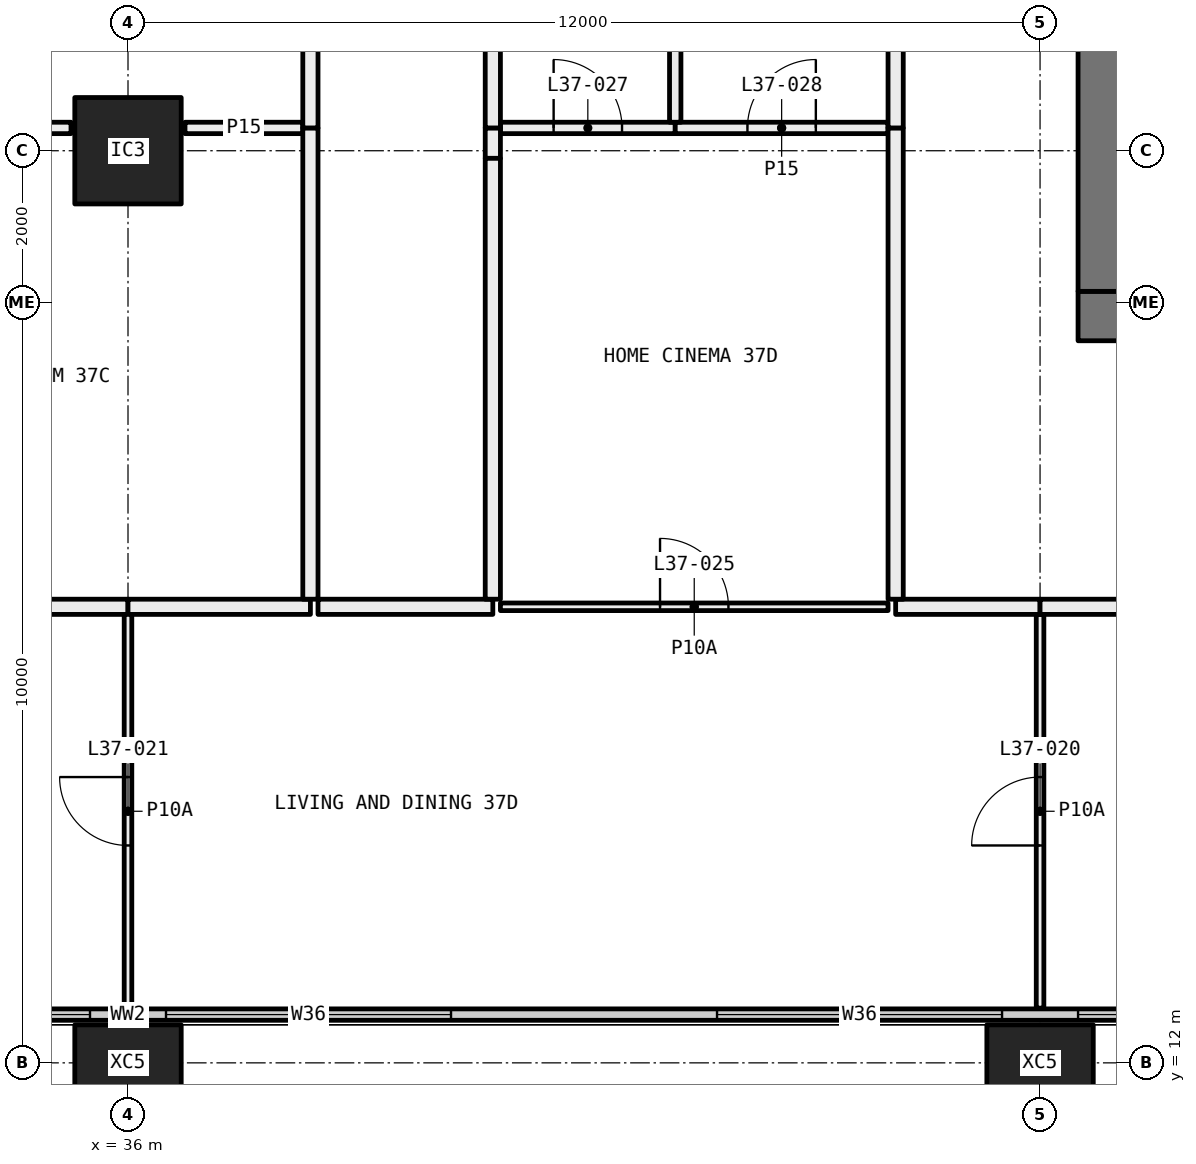
"""IFC4 building model, lengths in metres.
Left out: names, types, materials, properties, quantities, classifications, styles, units other than length and angle.
Written with IfcOpenShell. Run it as: python <this file> out.ifc"""

import sys

from ifc_helpers import new_model, si_unit, direction, frame, frame_2d, origin, origin_2d, place, context, subcontext, project, spatial, rectangle, hollow_rectangle, extrude, element, fill, save


model = new_model("IFC4")
c1 = context("Model", 3, precision=1e-05, world=origin(), true_north=direction((0.0, 1.0)))
c2 = subcontext(c1, "Body", "Model", "MODEL_VIEW")
j1 = project(units=[si_unit("LENGTHUNIT", "METRE"), si_unit("PLANEANGLEUNIT", "RADIAN")], contexts=[c1])
p1 = place(None, origin())
s1 = spatial("IfcSite", under=j1, at=p1, CompositionType="ELEMENT")
p2 = place(p1, origin())
s2 = spatial("IfcBuilding", under=s1, at=p2, CompositionType="ELEMENT")
p3 = place(p2, frame((0.0, 0.0, 141.45)))
s3 = spatial("IfcBuildingStorey", under=s2, at=p3, CompositionType="ELEMENT", Elevation=141.45)
p4 = place(p3, frame((36.0, 12.0, -0.4), z_axis=(0.0, 0.0, 1.0), x_axis=(1.0, 0.0, 0.0)))
e1 = element("IfcColumn", 1, at=p4, inside=s3, PredefinedType="COLUMN", context=c2, shape_type="SweptSolid", body=[
    extrude(hollow_rectangle(XDim=1.4, YDim=1.0, WallThickness=0.055, at=origin_2d()), origin(), (0.0, 0.0, 1.0), 3.45),
])
p5 = place(p3, frame((36.0, 24.0, 0.0), z_axis=(0.0, 0.0, 1.0), x_axis=(1.0, 0.0, 0.0)))
e2 = element("IfcColumn", 2, at=p5, inside=s3, PredefinedType="COLUMN", context=c2, shape_type="SweptSolid", body=[
    extrude(hollow_rectangle(XDim=1.4, YDim=1.4, WallThickness=0.06, at=origin_2d()), origin(), (0.0, 0.0, 1.0), 3.05),
])
p6 = place(p3, frame((48.0, 12.0, -0.4), z_axis=(0.0, 0.0, 1.0), x_axis=(1.0, 0.0, 0.0)))
e3 = element("IfcColumn", 3, at=p6, inside=s3, PredefinedType="COLUMN", context=c2, shape_type="SweptSolid", body=[
    extrude(hollow_rectangle(XDim=1.4, YDim=1.0, WallThickness=0.055, at=origin_2d()), origin(), (0.0, 0.0, 1.0), 3.45),
])
p7 = place(p3, frame((6.56, 12.635, 0.0), z_axis=(0.0, 0.0, 1.0), x_axis=(1.0, 0.0, 0.0)))
e4 = element("IfcWall", 4, at=p7, inside=s3, PredefinedType="ELEMENTEDWALL", context=c2, shape_type="SweptSolid", body=[
    extrude(rectangle(XDim=58.88, YDim=0.15, at=frame_2d((29.44, 0.0))), origin(), (0.0, 0.0, 1.0), 3.05),
])
p8 = place(p7, frame((0.44, 0.0, 0.45)))
e5 = element("IfcOpeningElement", 5, at=p8, cuts=e4, PredefinedType="OPENING", context=c2, shape_type="SweptSolid", body=[
    extrude(rectangle(XDim=4.5, YDim=2.55, at=frame_2d((2.25, 1.275))), frame((0.0, 0.085, 0.0), z_axis=(0.0, -1.0, 0.0), x_axis=(1.0, 0.0, 0.0)), (0.0, 0.0, 1.0), 0.17),
])
p9 = place(p7, frame((5.94, 0.0, 0.45)))
e6 = element("IfcOpeningElement", 6, at=p9, cuts=e4, PredefinedType="OPENING", context=c2, shape_type="SweptSolid", body=[
    extrude(rectangle(XDim=3.75, YDim=2.55, at=frame_2d((1.875, 1.275))), frame((0.0, 0.085, 0.0), z_axis=(0.0, -1.0, 0.0), x_axis=(1.0, 0.0, 0.0)), (0.0, 0.0, 1.0), 0.17),
])
p10 = place(p7, frame((13.19, 0.0, 0.45)))
e7 = element("IfcOpeningElement", 7, at=p10, cuts=e4, PredefinedType="OPENING", context=c2, shape_type="SweptSolid", body=[
    extrude(rectangle(XDim=3.75, YDim=2.55, at=frame_2d((1.875, 1.275))), frame((0.0, 0.085, 0.0), z_axis=(0.0, -1.0, 0.0), x_axis=(1.0, 0.0, 0.0)), (0.0, 0.0, 1.0), 0.17),
])
p11 = place(p7, frame((17.94, 0.0, 0.45)))
e8 = element("IfcOpeningElement", 8, at=p11, cuts=e4, PredefinedType="OPENING", context=c2, shape_type="SweptSolid", body=[
    extrude(rectangle(XDim=3.75, YDim=2.55, at=frame_2d((1.875, 1.275))), frame((0.0, 0.085, 0.0), z_axis=(0.0, -1.0, 0.0), x_axis=(1.0, 0.0, 0.0)), (0.0, 0.0, 1.0), 0.17),
])
p12 = place(p7, frame((25.19, 0.0, 0.45)))
e9 = element("IfcOpeningElement", 9, at=p12, cuts=e4, PredefinedType="OPENING", context=c2, shape_type="SweptSolid", body=[
    extrude(rectangle(XDim=0.75, YDim=2.55, at=frame_2d((0.375, 1.275))), frame((0.0, 0.085, 0.0), z_axis=(0.0, -1.0, 0.0), x_axis=(1.0, 0.0, 0.0)), (0.0, 0.0, 1.0), 0.17),
])
p13 = place(p7, frame((26.94, 0.0, 0.45)))
e10 = element("IfcOpeningElement", 10, at=p13, cuts=e4, PredefinedType="OPENING", context=c2, shape_type="SweptSolid", body=[
    extrude(rectangle(XDim=2.0, YDim=2.55, at=frame_2d((1.0, 1.275))), frame((0.0, 0.085, 0.0), z_axis=(0.0, -1.0, 0.0), x_axis=(1.0, 0.0, 0.0)), (0.0, 0.0, 1.0), 0.17),
])
p14 = place(p7, frame((29.94, 0.0, 0.45)))
e11 = element("IfcOpeningElement", 11, at=p14, cuts=e4, PredefinedType="OPENING", context=c2, shape_type="SweptSolid", body=[
    extrude(rectangle(XDim=3.75, YDim=2.55, at=frame_2d((1.875, 1.275))), frame((0.0, 0.085, 0.0), z_axis=(0.0, -1.0, 0.0), x_axis=(1.0, 0.0, 0.0)), (0.0, 0.0, 1.0), 0.17),
])
p15 = place(p7, frame((37.19, 0.0, 0.45)))
e12 = element("IfcOpeningElement", 12, at=p15, cuts=e4, PredefinedType="OPENING", context=c2, shape_type="SweptSolid", body=[
    extrude(rectangle(XDim=3.75, YDim=2.55, at=frame_2d((1.875, 1.275))), frame((0.0, 0.085, 0.0), z_axis=(0.0, -1.0, 0.0), x_axis=(1.0, 0.0, 0.0)), (0.0, 0.0, 1.0), 0.17),
])
p16 = place(p7, frame((41.94, 0.0, 0.45)))
e13 = element("IfcOpeningElement", 13, at=p16, cuts=e4, PredefinedType="OPENING", context=c2, shape_type="SweptSolid", body=[
    extrude(rectangle(XDim=3.75, YDim=2.55, at=frame_2d((1.875, 1.275))), frame((0.0, 0.085, 0.0), z_axis=(0.0, -1.0, 0.0), x_axis=(1.0, 0.0, 0.0)), (0.0, 0.0, 1.0), 0.17),
])
p17 = place(p7, frame((49.19, 0.0, 0.45)))
e14 = element("IfcOpeningElement", 14, at=p17, cuts=e4, PredefinedType="OPENING", context=c2, shape_type="SweptSolid", body=[
    extrude(rectangle(XDim=0.75, YDim=2.55, at=frame_2d((0.375, 1.275))), frame((0.0, 0.085, 0.0), z_axis=(0.0, -1.0, 0.0), x_axis=(1.0, 0.0, 0.0)), (0.0, 0.0, 1.0), 0.17),
])
p18 = place(p7, frame((50.94, 0.0, 0.45)))
e15 = element("IfcOpeningElement", 15, at=p18, cuts=e4, PredefinedType="OPENING", context=c2, shape_type="SweptSolid", body=[
    extrude(rectangle(XDim=2.0, YDim=2.55, at=frame_2d((1.0, 1.275))), frame((0.0, 0.085, 0.0), z_axis=(0.0, -1.0, 0.0), x_axis=(1.0, 0.0, 0.0)), (0.0, 0.0, 1.0), 0.17),
])
p19 = place(p7, frame((53.94, 0.0, 0.45)))
e16 = element("IfcOpeningElement", 16, at=p19, cuts=e4, PredefinedType="OPENING", context=c2, shape_type="SweptSolid", body=[
    extrude(rectangle(XDim=4.5, YDim=2.55, at=frame_2d((2.25, 1.275))), frame((0.0, 0.085, 0.0), z_axis=(0.0, -1.0, 0.0), x_axis=(1.0, 0.0, 0.0)), (0.0, 0.0, 1.0), 0.17),
])
p20 = place(p3, frame((35.25, 24.3, 0.0), z_axis=(0.0, 0.0, 1.0), x_axis=(-1.0, 0.0, 0.0)))
e17 = element("IfcWall", 17, at=p20, inside=s3, PredefinedType="PARTITIONING", context=c2, shape_type="SweptSolid", body=[
    extrude(rectangle(XDim=2.25, YDim=0.15, at=frame_2d((1.125, 0.0))), origin(), (0.0, 0.0, 1.0), 3.05),
])
p21 = place(p3, frame((38.3, 24.3, 0.0), z_axis=(0.0, 0.0, 1.0), x_axis=(-1.0, 0.0, 0.0)))
e18 = element("IfcWall", 18, at=p21, inside=s3, PredefinedType="PARTITIONING", context=c2, shape_type="SweptSolid", body=[
    extrude(rectangle(XDim=1.55, YDim=0.15, at=frame_2d((0.775, 0.0))), origin(), (0.0, 0.0, 1.0), 3.05),
])
p22 = place(p3, frame((30.0, 18.0, 0.0), z_axis=(0.0, 0.0, 1.0), x_axis=(1.0, 0.0, 0.0)))
e19 = element("IfcWall", 19, at=p22, inside=s3, PredefinedType="PARTITIONING", context=c2, shape_type="SweptSolid", body=[
    extrude(rectangle(XDim=6.0, YDim=0.2, at=frame_2d((3.0, 0.0))), origin(), (0.0, 0.0, 1.0), 2.45),
])
p23 = place(p3, frame((36.0, 18.0, 0.0), z_axis=(0.0, 0.0, 1.0), x_axis=(1.0, 0.0, 0.0)))
e20 = element("IfcWall", 20, at=p23, inside=s3, PredefinedType="PARTITIONING", context=c2, shape_type="SweptSolid", body=[
    extrude(rectangle(XDim=2.4, YDim=0.2, at=frame_2d((1.2, 0.0))), origin(), (0.0, 0.0, 1.0), 2.45),
])
p24 = place(p3, frame((38.4, 18.1, 0.0), z_axis=(0.0, 0.0, 1.0), x_axis=(0.0, 1.0, 0.0)))
e21 = element("IfcWall", 21, at=p24, inside=s3, PredefinedType="PARTITIONING", context=c2, shape_type="SweptSolid", body=[
    extrude(rectangle(XDim=6.2, YDim=0.2, at=frame_2d((3.1, 0.0))), origin(), (0.0, 0.0, 1.0), 2.45),
])
p25 = place(p3, frame((38.4, 24.3, 0.0), z_axis=(0.0, 0.0, 1.0), x_axis=(0.0, 1.0, 0.0)))
e22 = element("IfcWall", 22, at=p25, inside=s3, PredefinedType="PARTITIONING", context=c2, shape_type="SweptSolid", body=[
    extrude(rectangle(XDim=4.5, YDim=0.2, at=frame_2d((2.25, 0.0))), origin(), (0.0, 0.0, 1.0), 3.05),
])
p26 = place(p3, frame((36.0, 12.72, 0.0), z_axis=(0.0, 0.0, 1.0), x_axis=(0.0, 1.0, 0.0)))
e23 = element("IfcWall", 23, at=p26, inside=s3, PredefinedType="PARTITIONING", context=c2, shape_type="SweptSolid", body=[
    extrude(rectangle(XDim=5.18, YDim=0.1, at=frame_2d((2.59, 0.0))), origin(), (0.0, 0.0, 1.0), 2.45),
])
p27 = place(p26, frame((2.14, 0.0, 0.0)))
e24 = element("IfcOpeningElement", 24, at=p27, cuts=e23, PredefinedType="OPENING", context=c2, shape_type="SweptSolid", body=[
    extrude(rectangle(XDim=0.9, YDim=2.1, at=frame_2d((0.45, 1.05))), frame((0.0, 0.06, 0.0), z_axis=(0.0, -1.0, 0.0), x_axis=(1.0, 0.0, 0.0)), (0.0, 0.0, 1.0), 0.12),
])
p28 = place(p3, frame((48.0, 12.72, 0.0), z_axis=(0.0, 0.0, 1.0), x_axis=(0.0, 1.0, 0.0)))
e25 = element("IfcWall", 25, at=p28, inside=s3, PredefinedType="PARTITIONING", context=c2, shape_type="SweptSolid", body=[
    extrude(rectangle(XDim=5.18, YDim=0.1, at=frame_2d((2.59, 0.0))), origin(), (0.0, 0.0, 1.0), 3.05),
])
p29 = place(p28, frame((2.14, 0.0, 0.0)))
e26 = element("IfcOpeningElement", 26, at=p29, cuts=e25, PredefinedType="OPENING", context=c2, shape_type="SweptSolid", body=[
    extrude(rectangle(XDim=0.9, YDim=2.1, at=frame_2d((0.45, 1.05))), frame((0.0, 0.06, 0.0), z_axis=(0.0, -1.0, 0.0), x_axis=(1.0, 0.0, 0.0)), (0.0, 0.0, 1.0), 0.12),
])
p30 = place(p3, frame((46.0, 18.0, 0.0), z_axis=(0.0, 0.0, 1.0), x_axis=(-1.0, 0.0, 0.0)))
e27 = element("IfcWall", 27, at=p30, inside=s3, PredefinedType="PARTITIONING", context=c2, shape_type="SweptSolid", body=[
    extrude(rectangle(XDim=5.1, YDim=0.1, at=frame_2d((2.55, 0.0))), origin(), (0.0, 0.0, 1.0), 3.05),
])
p31 = place(p30, frame((2.1, 0.0, 0.0)))
e28 = element("IfcOpeningElement", 28, at=p31, cuts=e27, PredefinedType="OPENING", context=c2, shape_type="SweptSolid", body=[
    extrude(rectangle(XDim=0.9, YDim=2.1, at=frame_2d((0.45, 1.05))), frame((0.0, 0.06, 0.0), z_axis=(0.0, -1.0, 0.0), x_axis=(1.0, 0.0, 0.0)), (0.0, 0.0, 1.0), 0.12),
])
p32 = place(p3, frame((40.8, 18.0, 0.0), z_axis=(0.0, 0.0, 1.0), x_axis=(-1.0, 0.0, 0.0)))
e29 = element("IfcWall", 29, at=p32, inside=s3, PredefinedType="PARTITIONING", context=c2, shape_type="SweptSolid", body=[
    extrude(rectangle(XDim=2.3, YDim=0.2, at=frame_2d((1.15, 0.0))), origin(), (0.0, 0.0, 1.0), 3.05),
])
p33 = place(p3, frame((48.0, 18.0, 0.0), z_axis=(0.0, 0.0, 1.0), x_axis=(-1.0, 0.0, 0.0)))
e30 = element("IfcWall", 30, at=p33, inside=s3, PredefinedType="PARTITIONING", context=c2, shape_type="SweptSolid", body=[
    extrude(rectangle(XDim=1.9, YDim=0.2, at=frame_2d((0.95, 0.0))), origin(), (0.0, 0.0, 1.0), 3.05),
])
p34 = place(p3, frame((54.0, 18.0, 0.0), z_axis=(0.0, 0.0, 1.0), x_axis=(-1.0, 0.0, 0.0)))
e31 = element("IfcWall", 31, at=p34, inside=s3, PredefinedType="PARTITIONING", context=c2, shape_type="SweptSolid", body=[
    extrude(rectangle(XDim=6.0, YDim=0.2, at=frame_2d((3.0, 0.0))), origin(), (0.0, 0.0, 1.0), 3.05),
])
p35 = place(p34, frame((2.5, 0.0, 0.0)))
e32 = element("IfcOpeningElement", 32, at=p35, cuts=e31, PredefinedType="OPENING", context=c2, shape_type="SweptSolid", body=[
    extrude(rectangle(XDim=1.0, YDim=2.1, at=frame_2d((0.5, 1.05))), frame((0.0, 0.11, 0.0), z_axis=(0.0, -1.0, 0.0), x_axis=(1.0, 0.0, 0.0)), (0.0, 0.0, 1.0), 0.22),
])
p36 = place(p3, frame((43.2, 24.3, 0.0), z_axis=(0.0, 0.0, 1.0), x_axis=(-1.0, 0.0, 0.0)))
e33 = element("IfcWall", 33, at=p36, inside=s3, PredefinedType="PARTITIONING", context=c2, shape_type="SweptSolid", body=[
    extrude(rectangle(XDim=2.3, YDim=0.15, at=frame_2d((1.15, 0.0))), origin(), (0.0, 0.0, 1.0), 3.05),
])
p37 = place(p36, frame((0.7, 0.0, 0.0)))
e34 = element("IfcOpeningElement", 34, at=p37, cuts=e33, PredefinedType="OPENING", context=c2, shape_type="SweptSolid", body=[
    extrude(rectangle(XDim=0.9, YDim=2.1, at=frame_2d((0.45, 1.05))), frame((0.0, 0.085, 0.0), z_axis=(0.0, -1.0, 0.0), x_axis=(1.0, 0.0, 0.0)), (0.0, 0.0, 1.0), 0.17),
])
p38 = place(p3, frame((46.0, 24.3, 0.0), z_axis=(0.0, 0.0, 1.0), x_axis=(-1.0, 0.0, 0.0)))
e35 = element("IfcWall", 35, at=p38, inside=s3, PredefinedType="PARTITIONING", context=c2, shape_type="SweptSolid", body=[
    extrude(rectangle(XDim=2.8, YDim=0.15, at=frame_2d((1.4, 0.0))), origin(), (0.0, 0.0, 1.0), 3.05),
])
p39 = place(p38, frame((0.95, 0.0, 0.0)))
e36 = element("IfcOpeningElement", 36, at=p39, cuts=e35, PredefinedType="OPENING", context=c2, shape_type="SweptSolid", body=[
    extrude(rectangle(XDim=0.9, YDim=2.1, at=frame_2d((0.45, 1.05))), frame((0.0, 0.085, 0.0), z_axis=(0.0, -1.0, 0.0), x_axis=(1.0, 0.0, 0.0)), (0.0, 0.0, 1.0), 0.17),
])
p40 = place(p3, frame((40.8, 24.3, 0.0), z_axis=(0.0, 0.0, 1.0), x_axis=(0.0, -1.0, 0.0)))
e37 = element("IfcWall", 37, at=p40, inside=s3, PredefinedType="PARTITIONING", context=c2, shape_type="SweptSolid", body=[
    extrude(rectangle(XDim=0.4, YDim=0.2, at=frame_2d((0.2, 0.0))), origin(), (0.0, 0.0, 1.0), 2.45),
])
p41 = place(p3, frame((40.8, 23.9, 0.0), z_axis=(0.0, 0.0, 1.0), x_axis=(0.0, -1.0, 0.0)))
e38 = element("IfcWall", 38, at=p41, inside=s3, PredefinedType="PARTITIONING", context=c2, shape_type="SweptSolid", body=[
    extrude(rectangle(XDim=5.8, YDim=0.2, at=frame_2d((2.9, 0.0))), origin(), (0.0, 0.0, 1.0), 3.05),
])
p42 = place(p3, frame((46.1, 18.1, 0.0), z_axis=(0.0, 0.0, 1.0), x_axis=(0.0, 1.0, 0.0)))
e39 = element("IfcWall", 39, at=p42, inside=s3, PredefinedType="PARTITIONING", context=c2, shape_type="SweptSolid", body=[
    extrude(rectangle(XDim=6.2, YDim=0.2, at=frame_2d((3.1, 0.0))), origin(), (0.0, 0.0, 1.0), 2.45),
])
p43 = place(p3, frame((43.2, 24.375, 0.0), z_axis=(0.0, 0.0, 1.0), x_axis=(0.0, 1.0, 0.0)))
e40 = element("IfcWall", 40, at=p43, inside=s3, PredefinedType="PARTITIONING", context=c2, shape_type="SweptSolid", body=[
    extrude(rectangle(XDim=2.1, YDim=0.15, at=frame_2d((1.05, 0.0))), origin(), (0.0, 0.0, 1.0), 3.05),
])
p44 = place(p3, frame((40.8, 26.55, 0.0), z_axis=(0.0, 0.0, 1.0), x_axis=(0.0, -1.0, 0.0)))
e41 = element("IfcWall", 41, at=p44, inside=s3, PredefinedType="PARTITIONING", context=c2, shape_type="SweptSolid", body=[
    extrude(rectangle(XDim=2.25, YDim=0.2, at=frame_2d((1.125, 0.0))), origin(), (0.0, 0.0, 1.0), 3.05),
])
p45 = place(p3, frame((46.1, 24.3, 0.0), z_axis=(0.0, 0.0, 1.0), x_axis=(0.0, 1.0, 0.0)))
e42 = element("IfcWall", 42, at=p45, inside=s3, PredefinedType="PARTITIONING", context=c2, shape_type="SweptSolid", body=[
    extrude(rectangle(XDim=4.5, YDim=0.2, at=frame_2d((2.25, 0.0))), origin(), (0.0, 0.0, 1.0), 3.05),
])
p46 = place(p3, frame((59.5, 21.825, 0.0), z_axis=(0.0, 0.0, 1.0), x_axis=(-1.0, 0.0, 0.0)))
e43 = element("IfcWall", 43, at=p46, inside=s3, PredefinedType="SHEAR", context=c2, shape_type="SweptSolid", body=[
    extrude(rectangle(XDim=11.0, YDim=0.65, at=frame_2d((5.5, 0.0))), origin(), (0.0, 0.0, 1.0), 3.05),
])
p47 = place(p3, frame((48.825, 22.15, 0.0), z_axis=(0.0, 0.0, 1.0), x_axis=(0.0, 1.0, 0.0)))
e44 = element("IfcWall", 44, at=p47, inside=s3, PredefinedType="SHEAR", context=c2, shape_type="SweptSolid", body=[
    extrude(rectangle(XDim=15.7, YDim=0.65, at=frame_2d((7.85, 0.0))), origin(), (0.0, 0.0, 1.0), 3.05),
])
p48 = place(p47, frame((7.05, 0.0, 0.0)))
e45 = element("IfcOpeningElement", 45, at=p48, cuts=e44, PredefinedType="OPENING", context=c2, shape_type="SweptSolid", body=[
    extrude(rectangle(XDim=1.6, YDim=2.1, at=frame_2d((0.8, 1.05))), frame((0.0, 0.335, 0.0), z_axis=(0.0, -1.0, 0.0), x_axis=(1.0, 0.0, 0.0)), (0.0, 0.0, 1.0), 0.67),
])
p49 = place(p13, origin())
e46 = element("IfcWindow", 46, at=p49, inside=s3, PartitioningType="SINGLE_PANEL", PredefinedType="WINDOW", context=c2, shape_type="SweptSolid", body=[
    extrude(rectangle(XDim=2.0, YDim=2.55, at=frame_2d((1.0, 1.275))), frame((0.0, 0.03, 0.0), z_axis=(0.0, -1.0, 0.0), x_axis=(1.0, 0.0, 0.0)), (0.0, 0.0, 1.0), 0.06),
])
fill(e10, e46)
p50 = place(p14, origin())
e47 = element("IfcWindow", 47, at=p50, inside=s3, PartitioningType="SINGLE_PANEL", PredefinedType="WINDOW", context=c2, shape_type="SweptSolid", body=[
    extrude(rectangle(XDim=3.75, YDim=2.55, at=frame_2d((1.875, 1.275))), frame((0.0, 0.03, 0.0), z_axis=(0.0, -1.0, 0.0), x_axis=(1.0, 0.0, 0.0)), (0.0, 0.0, 1.0), 0.06),
])
fill(e11, e47)
p51 = place(p15, origin())
e48 = element("IfcWindow", 48, at=p51, inside=s3, PartitioningType="SINGLE_PANEL", PredefinedType="WINDOW", context=c2, shape_type="SweptSolid", body=[
    extrude(rectangle(XDim=3.75, YDim=2.55, at=frame_2d((1.875, 1.275))), frame((0.0, 0.03, 0.0), z_axis=(0.0, -1.0, 0.0), x_axis=(1.0, 0.0, 0.0)), (0.0, 0.0, 1.0), 0.06),
])
fill(e12, e48)
p52 = place(p16, origin())
e49 = element("IfcWindow", 49, at=p52, inside=s3, PartitioningType="SINGLE_PANEL", PredefinedType="WINDOW", context=c2, shape_type="SweptSolid", body=[
    extrude(rectangle(XDim=3.75, YDim=2.55, at=frame_2d((1.875, 1.275))), frame((0.0, 0.03, 0.0), z_axis=(0.0, -1.0, 0.0), x_axis=(1.0, 0.0, 0.0)), (0.0, 0.0, 1.0), 0.06),
])
fill(e13, e49)
p53 = place(p29, origin())
e50 = element("IfcDoor", 50, at=p53, inside=s3, OperationType="SINGLE_SWING_RIGHT", PredefinedType="DOOR", context=c2, shape_type="SweptSolid", body=[
    extrude(rectangle(XDim=0.9, YDim=2.1, at=frame_2d((0.45, 1.05))), frame((0.0, 0.025, 0.0), z_axis=(0.0, -1.0, 0.0), x_axis=(1.0, 0.0, 0.0)), (0.0, 0.0, 1.0), 0.05),
])
fill(e26, e50)
p54 = place(p27, origin())
e51 = element("IfcDoor", 51, at=p54, inside=s3, OperationType="SINGLE_SWING_LEFT", PredefinedType="DOOR", context=c2, shape_type="SweptSolid", body=[
    extrude(rectangle(XDim=0.9, YDim=2.1, at=frame_2d((0.45, 1.05))), frame((0.0, 0.025, 0.0), z_axis=(0.0, -1.0, 0.0), x_axis=(1.0, 0.0, 0.0)), (0.0, 0.0, 1.0), 0.05),
])
fill(e24, e51)
p55 = place(p31, frame((0.9, 0.0, 0.0), x_axis=(-1.0, 0.0, 0.0)))
e52 = element("IfcDoor", 52, at=p55, inside=s3, OperationType="SINGLE_SWING_RIGHT", PredefinedType="DOOR", context=c2, shape_type="SweptSolid", body=[
    extrude(rectangle(XDim=0.9, YDim=2.1, at=frame_2d((0.45, 1.05))), frame((0.0, 0.025, 0.0), z_axis=(0.0, -1.0, 0.0), x_axis=(1.0, 0.0, 0.0)), (0.0, 0.0, 1.0), 0.05),
])
fill(e28, e52)
p56 = place(p37, frame((0.9, 0.0, 0.0), x_axis=(-1.0, 0.0, 0.0)))
e53 = element("IfcDoor", 53, at=p56, inside=s3, OperationType="SINGLE_SWING_RIGHT", PredefinedType="DOOR", context=c2, shape_type="SweptSolid", body=[
    extrude(rectangle(XDim=0.9, YDim=2.1, at=frame_2d((0.45, 1.05))), frame((0.0, 0.025, 0.0), z_axis=(0.0, -1.0, 0.0), x_axis=(1.0, 0.0, 0.0)), (0.0, 0.0, 1.0), 0.05),
])
fill(e34, e53)
p57 = place(p39, frame((0.9, 0.0, 0.0), x_axis=(-1.0, 0.0, 0.0)))
e54 = element("IfcDoor", 54, at=p57, inside=s3, OperationType="SINGLE_SWING_LEFT", PredefinedType="DOOR", context=c2, shape_type="SweptSolid", body=[
    extrude(rectangle(XDim=0.9, YDim=2.1, at=frame_2d((0.45, 1.05))), frame((0.0, 0.025, 0.0), z_axis=(0.0, -1.0, 0.0), x_axis=(1.0, 0.0, 0.0)), (0.0, 0.0, 1.0), 0.05),
])
fill(e36, e54)
save(model, sys.argv[1])
